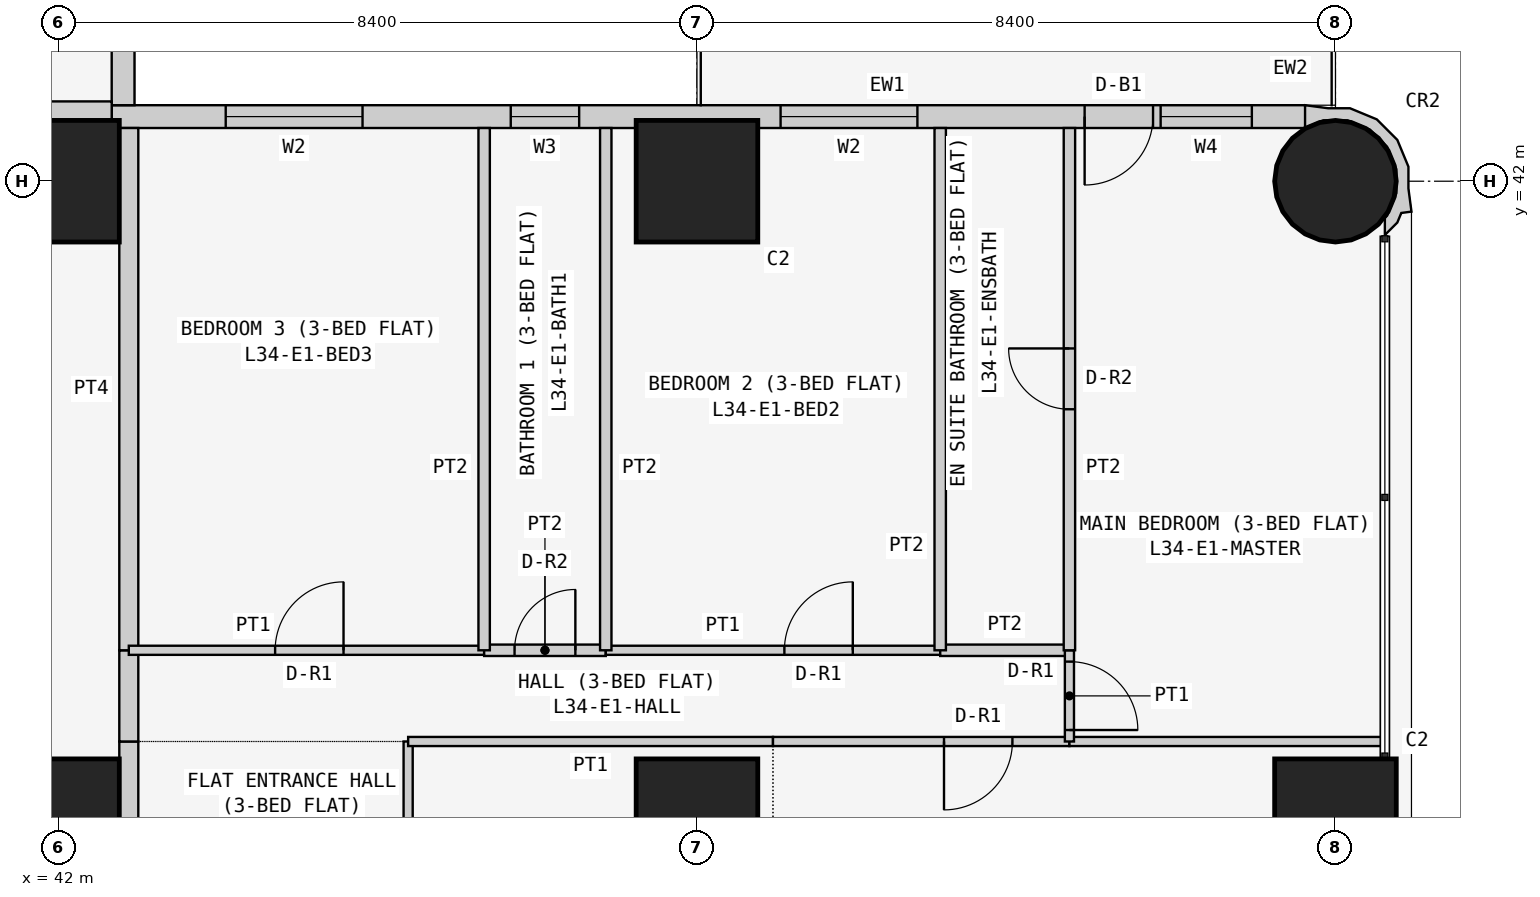
"""IFC4 building model, lengths in metres.
Left out: names, types, materials, properties, quantities, classifications, styles, units other than length and angle.
Written with IfcOpenShell. Run it as: python <this file> out.ifc"""

import sys

from ifc_helpers import new_model, si_unit, direction, frame, frame_2d, origin, origin_2d, place, context, subcontext, project, spatial, polyline, rectangle, circle, outline, extrude, element, fill, save


model = new_model("IFC4")
c1 = context("Model", 3, precision=1e-05, world=origin(), true_north=direction((0.0, 1.0)))
c2 = subcontext(c1, "Body", "Model", "MODEL_VIEW")
j1 = project(units=[si_unit("LENGTHUNIT", "METRE"), si_unit("PLANEANGLEUNIT", "RADIAN")], contexts=[c1])
p1 = place(None, origin())
s1 = spatial("IfcSite", under=j1, at=p1, CompositionType="ELEMENT")
p2 = place(p1, origin())
s2 = spatial("IfcBuilding", under=s1, at=p2, CompositionType="ELEMENT")
p3 = place(p2, frame((0.0, 0.0, 134.1)))
s3 = spatial("IfcBuildingStorey", under=s2, at=p3, CompositionType="ELEMENT", Elevation=134.1)
for number, where, z_axis, x_axis in (
    (1, (42.0, 33.6, 0.0), (0.0, 0.0, 1.0), (1.0, 0.0, 0.0)),
    (2, (42.0, 42.0, 0.0), (0.0, 0.0, 1.0), (1.0, 0.0, 0.0)),
    (3, (50.4, 33.6, 0.0), (0.0, 0.0, 1.0), (1.0, 0.0, 0.0)),
    (4, (50.4, 42.0, 0.0), (0.0, 0.0, 1.0), (1.0, 0.0, 0.0)),
    (5, (58.8, 33.6, 0.0), (0.0, 0.0, 1.0), (1.0, 0.0, 0.0)),
):
    element("IfcColumn", number, at=place(p3, frame(where, z_axis=z_axis, x_axis=x_axis)), inside=s3, PredefinedType="COLUMN", context=c2, shape_type="SweptSolid", body=[
        extrude(rectangle(XDim=1.6, YDim=1.6, at=origin_2d()), origin(), (0.0, 0.0, 1.0), 3.6),
    ])
p4 = place(p3, frame((58.8, 42.0, 0.0), z_axis=(0.0, 0.0, 1.0), x_axis=(1.0, 0.0, 0.0)))
e6 = element("IfcColumn", 6, at=p4, inside=s3, PredefinedType="COLUMN", context=c2, shape_type="SweptSolid", body=[
    extrude(circle(Radius=0.8, at=origin_2d()), origin(), (0.0, 0.0, 1.0), 3.6),
])
p5 = place(p3, frame((58.4, 42.85, 0.0), z_axis=(0.0, 0.0, 1.0), x_axis=(-1.0, 0.0, 0.0)))
e7 = element("IfcWall", 7, at=p5, inside=s3, PredefinedType="SOLIDWALL", context=c2, shape_type="SweptSolid", body=[
    extrude(rectangle(XDim=15.7, YDim=0.3, at=frame_2d((7.85, 0.0))), origin(), (0.0, 0.0, 1.0), 3.45),
])
p6 = place(p5, frame((12.4, 0.0, 0.9)))
e8 = element("IfcOpeningElement", 8, at=p6, cuts=e7, PredefinedType="OPENING", context=c2, shape_type="SweptSolid", body=[
    extrude(rectangle(XDim=1.8, YDim=1.5, at=frame_2d((0.9, 0.75))), frame((0.0, 0.16, 0.0), z_axis=(0.0, -1.0, 0.0), x_axis=(1.0, 0.0, 0.0)), (0.0, 0.0, 1.0), 0.32),
])
p7 = place(p5, frame((9.55, 0.0, 1.5)))
e9 = element("IfcOpeningElement", 9, at=p7, cuts=e7, PredefinedType="OPENING", context=c2, shape_type="SweptSolid", body=[
    extrude(rectangle(XDim=0.9, YDim=0.7, at=frame_2d((0.45, 0.35))), frame((0.0, 0.16, 0.0), z_axis=(0.0, -1.0, 0.0), x_axis=(1.0, 0.0, 0.0)), (0.0, 0.0, 1.0), 0.32),
])
p8 = place(p5, frame((5.1, 0.0, 0.9)))
e10 = element("IfcOpeningElement", 10, at=p8, cuts=e7, PredefinedType="OPENING", context=c2, shape_type="SweptSolid", body=[
    extrude(rectangle(XDim=1.8, YDim=1.5, at=frame_2d((0.9, 0.75))), frame((0.0, 0.16, 0.0), z_axis=(0.0, -1.0, 0.0), x_axis=(1.0, 0.0, 0.0)), (0.0, 0.0, 1.0), 0.32),
])
p9 = place(p5, frame((2.0, 0.0, 0.0)))
e11 = element("IfcOpeningElement", 11, at=p9, cuts=e7, PredefinedType="OPENING", context=c2, shape_type="SweptSolid", body=[
    extrude(rectangle(XDim=0.9, YDim=2.4, at=frame_2d((0.45, 1.2))), frame((0.0, 0.16, 0.0), z_axis=(0.0, -1.0, 0.0), x_axis=(1.0, 0.0, 0.0)), (0.0, 0.0, 1.0), 0.32),
])
p10 = place(p5, frame((0.7, 0.0, 0.9)))
e12 = element("IfcOpeningElement", 12, at=p10, cuts=e7, PredefinedType="OPENING", context=c2, shape_type="SweptSolid", body=[
    extrude(rectangle(XDim=1.2, YDim=1.5, at=frame_2d((0.6, 0.75))), frame((0.0, 0.16, 0.0), z_axis=(0.0, -1.0, 0.0), x_axis=(1.0, 0.0, 0.0)), (0.0, 0.0, 1.0), 0.32),
])
p11 = place(p3, frame((42.85, 43.0, 0.0), z_axis=(0.0, 0.0, 1.0), x_axis=(0.0, 1.0, 0.0)))
e13 = element("IfcWall", 13, at=p11, inside=s3, PredefinedType="SOLIDWALL", context=c2, shape_type="SweptSolid", body=[
    extrude(rectangle(XDim=7.0, YDim=0.3, at=frame_2d((3.5, 0.0))), origin(), (0.0, 0.0, 1.0), 3.45),
])
p12 = place(p11, frame((1.5, 0.0, 0.9)))
e14 = element("IfcOpeningElement", 14, at=p12, cuts=e13, PredefinedType="OPENING", context=c2, shape_type="SweptSolid", body=[
    extrude(rectangle(XDim=2.4, YDim=1.5, at=frame_2d((1.2, 0.75))), frame((0.0, 0.16, 0.0), z_axis=(0.0, -1.0, 0.0), x_axis=(1.0, 0.0, 0.0)), (0.0, 0.0, 1.0), 0.32),
])
p13 = place(p11, frame((5.05, 0.0, 0.9)))
e15 = element("IfcOpeningElement", 15, at=p13, cuts=e13, PredefinedType="OPENING", context=c2, shape_type="SweptSolid", body=[
    extrude(rectangle(XDim=1.2, YDim=1.5, at=frame_2d((0.6, 0.75))), frame((0.0, 0.16, 0.0), z_axis=(0.0, -1.0, 0.0), x_axis=(1.0, 0.0, 0.0)), (0.0, 0.0, 1.0), 0.32),
])
p14 = place(p3, frame((59.395, 41.352, 0.0), z_axis=(0.0, 0.0, 1.0), x_axis=(0.93923434088, 0.343276641956, 0.0)))
e16 = element("IfcWall", 16, at=p14, inside=s3, PredefinedType="SOLIDWALL", context=c2, shape_type="SweptSolid", body=[
    extrude(outline(polyline([(0.532, 0.393), (0.631, 0.663), (0.614, 1.044), (0.453, 1.391), (0.172, 1.649), (-0.097, 1.748), (-0.369, 1.89), (-0.509, 1.621), (-0.491, 1.615), (-0.479, 1.609), (-0.211, 1.62), (0.088, 1.511), (0.323, 1.295), (0.457, 1.006), (0.47, 0.688), (0.361, 0.389), (0.145, 0.154), (0.108, 0.136), (0.031, -0.075), (0.241, 0.023), (0.333, 0.124), (0.465, 0.094), (0.532, 0.393)])), origin(), (0.0, 0.0, 1.0), 3.45),
])
p15 = place(p3, frame((35.829, 42.925, 0.0), z_axis=(0.0, 0.0, 1.0), x_axis=(1.0, 0.0, 0.0)))
e17 = element("IfcWall", 17, at=p15, inside=s3, PredefinedType="PARTITIONING", context=c2, shape_type="SweptSolid", body=[
    extrude(rectangle(XDim=6.871, YDim=0.25, at=frame_2d((3.436, 0.0))), origin(), (0.0, 0.0, 1.0), 3.45),
])
p16 = place(p3, frame((42.925, 34.629, 0.0), z_axis=(0.0, 0.0, 1.0), x_axis=(0.0, -1.0, 0.0)))
e18 = element("IfcWall", 18, at=p16, inside=s3, PredefinedType="PARTITIONING", context=c2, shape_type="SweptSolid", body=[
    extrude(rectangle(XDim=5.229, YDim=0.25, at=frame_2d((2.615, 0.0))), origin(), (0.0, 0.0, 1.0), 3.45),
])
p17 = place(p16, frame((2.129, 0.0, 0.0)))
e19 = element("IfcOpeningElement", 19, at=p17, cuts=e18, PredefinedType="OPENING", context=c2, shape_type="SweptSolid", body=[
    extrude(rectangle(XDim=1.0, YDim=2.1, at=frame_2d((0.5, 1.05))), frame((0.0, 0.135, 0.0), z_axis=(0.0, -1.0, 0.0), x_axis=(1.0, 0.0, 0.0)), (0.0, 0.0, 1.0), 0.27),
])
p18 = place(p3, frame((42.925, 35.829, 0.0), z_axis=(0.0, 0.0, 1.0), x_axis=(0.0, -1.0, 0.0)))
e20 = element("IfcWall", 20, at=p18, inside=s3, PredefinedType="PARTITIONING", context=c2, shape_type="SweptSolid", body=[
    extrude(rectangle(XDim=1.2, YDim=0.25, at=frame_2d((0.6, 0.0))), origin(), (0.0, 0.0, 1.0), 3.45),
])
p19 = place(p3, frame((42.925, 42.7, 0.0), z_axis=(0.0, 0.0, 1.0), x_axis=(0.0, -1.0, 0.0)))
e21 = element("IfcWall", 21, at=p19, inside=s3, PredefinedType="PARTITIONING", context=c2, shape_type="SweptSolid", body=[
    extrude(rectangle(XDim=6.871, YDim=0.25, at=frame_2d((3.436, 0.0))), origin(), (0.0, 0.0, 1.0), 3.45),
])
p20 = place(p3, frame((46.6, 29.4, 0.0), z_axis=(0.0, 0.0, 1.0), x_axis=(0.0, 1.0, 0.0)))
e22 = element("IfcWall", 22, at=p20, inside=s3, PredefinedType="PARTITIONING", context=c2, shape_type="SweptSolid", body=[
    extrude(rectangle(XDim=5.229, YDim=0.12, at=frame_2d((2.615, 0.0))), origin(), (0.0, 0.0, 1.0), 3.45),
])
p21 = place(p20, frame((1.05, 0.0, 0.0)))
e23 = element("IfcOpeningElement", 23, at=p21, cuts=e22, PredefinedType="OPENING", context=c2, shape_type="SweptSolid", body=[
    extrude(rectangle(XDim=0.9, YDim=2.1, at=frame_2d((0.45, 1.05))), frame((0.0, 0.07, 0.0), z_axis=(0.0, -1.0, 0.0), x_axis=(1.0, 0.0, 0.0)), (0.0, 0.0, 1.0), 0.14),
])
p22 = place(p3, frame((51.4, 34.629, 0.0), z_axis=(0.0, 0.0, 1.0), x_axis=(-1.0, 0.0, 0.0)))
e24 = element("IfcWall", 24, at=p22, inside=s3, PredefinedType="PARTITIONING", context=c2, shape_type="SweptSolid", body=[
    extrude(rectangle(XDim=4.8, YDim=0.12, at=frame_2d((2.4, 0.0))), origin(), (0.0, 0.0, 1.0), 3.45),
])
p23 = place(p3, frame((55.3, 34.629, 0.0), z_axis=(0.0, 0.0, 1.0), x_axis=(-1.0, 0.0, 0.0)))
e25 = element("IfcWall", 25, at=p23, inside=s3, PredefinedType="PARTITIONING", context=c2, shape_type="SweptSolid", body=[
    extrude(rectangle(XDim=3.9, YDim=0.12, at=frame_2d((1.95, 0.0))), origin(), (0.0, 0.0, 1.0), 3.45),
])
p24 = place(p23, frame((0.75, 0.0, 0.0)))
e26 = element("IfcOpeningElement", 26, at=p24, cuts=e25, PredefinedType="OPENING", context=c2, shape_type="SweptSolid", body=[
    extrude(rectangle(XDim=0.9, YDim=2.1, at=frame_2d((0.45, 1.05))), frame((0.0, 0.07, 0.0), z_axis=(0.0, -1.0, 0.0), x_axis=(1.0, 0.0, 0.0)), (0.0, 0.0, 1.0), 0.14),
])
p25 = place(p3, frame((59.45, 34.629, 0.0), z_axis=(0.0, 0.0, 1.0), x_axis=(-1.0, 0.0, 0.0)))
e27 = element("IfcWall", 27, at=p25, inside=s3, PredefinedType="PARTITIONING", context=c2, shape_type="SweptSolid", body=[
    extrude(rectangle(XDim=4.15, YDim=0.12, at=frame_2d((2.075, 0.0))), origin(), (0.0, 0.0, 1.0), 3.45),
])
p26 = place(p3, frame((47.6, 35.829, 0.0), z_axis=(0.0, 0.0, 1.0), x_axis=(-1.0, 0.0, 0.0)))
e28 = element("IfcWall", 28, at=p26, inside=s3, PredefinedType="PARTITIONING", context=c2, shape_type="SweptSolid", body=[
    extrude(rectangle(XDim=4.675, YDim=0.12, at=frame_2d((2.337, 0.0))), origin(), (0.0, 0.0, 1.0), 3.45),
])
p27 = place(p26, frame((1.85, 0.0, 0.0)))
e29 = element("IfcOpeningElement", 29, at=p27, cuts=e28, PredefinedType="OPENING", context=c2, shape_type="SweptSolid", body=[
    extrude(rectangle(XDim=0.9, YDim=2.1, at=frame_2d((0.45, 1.05))), frame((0.0, 0.07, 0.0), z_axis=(0.0, -1.0, 0.0), x_axis=(1.0, 0.0, 0.0)), (0.0, 0.0, 1.0), 0.14),
])
p28 = place(p3, frame((49.2, 35.829, 0.0), z_axis=(0.0, 0.0, 1.0), x_axis=(-1.0, 0.0, 0.0)))
e30 = element("IfcWall", 30, at=p28, inside=s3, PredefinedType="PARTITIONING", context=c2, shape_type="SweptSolid", body=[
    extrude(rectangle(XDim=1.6, YDim=0.15, at=frame_2d((0.8, 0.0))), origin(), (0.0, 0.0, 1.0), 3.45),
])
p29 = place(p28, frame((0.4, 0.0, 0.0)))
e31 = element("IfcOpeningElement", 31, at=p29, cuts=e30, PredefinedType="OPENING", context=c2, shape_type="SweptSolid", body=[
    extrude(rectangle(XDim=0.8, YDim=2.1, at=frame_2d((0.4, 1.05))), frame((0.0, 0.085, 0.0), z_axis=(0.0, -1.0, 0.0), x_axis=(1.0, 0.0, 0.0)), (0.0, 0.0, 1.0), 0.17),
])
p30 = place(p3, frame((53.6, 35.829, 0.0), z_axis=(0.0, 0.0, 1.0), x_axis=(-1.0, 0.0, 0.0)))
e32 = element("IfcWall", 32, at=p30, inside=s3, PredefinedType="PARTITIONING", context=c2, shape_type="SweptSolid", body=[
    extrude(rectangle(XDim=4.4, YDim=0.12, at=frame_2d((2.2, 0.0))), origin(), (0.0, 0.0, 1.0), 3.45),
])
p31 = place(p30, frame((1.15, 0.0, 0.0)))
e33 = element("IfcOpeningElement", 33, at=p31, cuts=e32, PredefinedType="OPENING", context=c2, shape_type="SweptSolid", body=[
    extrude(rectangle(XDim=0.9, YDim=2.1, at=frame_2d((0.45, 1.05))), frame((0.0, 0.07, 0.0), z_axis=(0.0, -1.0, 0.0), x_axis=(1.0, 0.0, 0.0)), (0.0, 0.0, 1.0), 0.14),
])
p32 = place(p3, frame((55.3, 35.829, 0.0), z_axis=(0.0, 0.0, 1.0), x_axis=(-1.0, 0.0, 0.0)))
e34 = element("IfcWall", 34, at=p32, inside=s3, PredefinedType="PARTITIONING", context=c2, shape_type="SweptSolid", body=[
    extrude(rectangle(XDim=1.7, YDim=0.15, at=frame_2d((0.85, 0.0))), origin(), (0.0, 0.0, 1.0), 3.45),
])
p33 = place(p3, frame((55.3, 34.629, 0.0), z_axis=(0.0, 0.0, 1.0), x_axis=(0.0, 1.0, 0.0)))
e35 = element("IfcWall", 35, at=p33, inside=s3, PredefinedType="PARTITIONING", context=c2, shape_type="SweptSolid", body=[
    extrude(rectangle(XDim=1.2, YDim=0.12, at=frame_2d((0.6, 0.0))), origin(), (0.0, 0.0, 1.0), 3.45),
])
p34 = place(p33, frame((0.151, 0.0, 0.0)))
e36 = element("IfcOpeningElement", 36, at=p34, cuts=e35, PredefinedType="OPENING", context=c2, shape_type="SweptSolid", body=[
    extrude(rectangle(XDim=0.9, YDim=2.1, at=frame_2d((0.45, 1.05))), frame((0.0, 0.07, 0.0), z_axis=(0.0, -1.0, 0.0), x_axis=(1.0, 0.0, 0.0)), (0.0, 0.0, 1.0), 0.14),
])
for number, where, z_axis, x_axis in (
    (37, (47.6, 35.829, 0.0), (0.0, 0.0, 1.0), (0.0, 1.0, 0.0)),
    (38, (49.2, 35.829, 0.0), (0.0, 0.0, 1.0), (0.0, 1.0, 0.0)),
    (39, (53.6, 35.829, 0.0), (0.0, 0.0, 1.0), (0.0, 1.0, 0.0)),
):
    element("IfcWall", number, at=place(p3, frame(where, z_axis=z_axis, x_axis=x_axis)), inside=s3, PredefinedType="PARTITIONING", context=c2, shape_type="SweptSolid", body=[
        extrude(rectangle(XDim=6.871, YDim=0.15, at=frame_2d((3.436, 0.0))), origin(), (0.0, 0.0, 1.0), 3.45),
    ])
p35 = place(p3, frame((55.3, 35.829, 0.0), z_axis=(0.0, 0.0, 1.0), x_axis=(0.0, 1.0, 0.0)))
e40 = element("IfcWall", 40, at=p35, inside=s3, PredefinedType="PARTITIONING", context=c2, shape_type="SweptSolid", body=[
    extrude(rectangle(XDim=6.871, YDim=0.15, at=frame_2d((3.436, 0.0))), origin(), (0.0, 0.0, 1.0), 3.45),
])
p36 = place(p35, frame((3.171, 0.0, 0.0)))
e41 = element("IfcOpeningElement", 41, at=p36, cuts=e40, PredefinedType="OPENING", context=c2, shape_type="SweptSolid", body=[
    extrude(rectangle(XDim=0.8, YDim=2.1, at=frame_2d((0.4, 1.05))), frame((0.0, 0.085, 0.0), z_axis=(0.0, -1.0, 0.0), x_axis=(1.0, 0.0, 0.0)), (0.0, 0.0, 1.0), 0.17),
])
p37 = place(p6, origin())
e42 = element("IfcWindow", 42, at=p37, inside=s3, PartitioningType="SINGLE_PANEL", PredefinedType="WINDOW", context=c2, shape_type="SweptSolid", body=[
    extrude(rectangle(XDim=1.8, YDim=1.5, at=frame_2d((0.9, 0.75))), frame((0.0, 0.03, 0.0), z_axis=(0.0, -1.0, 0.0), x_axis=(1.0, 0.0, 0.0)), (0.0, 0.0, 1.0), 0.06),
])
fill(e8, e42)
p38 = place(p7, origin())
e43 = element("IfcWindow", 43, at=p38, inside=s3, PartitioningType="SINGLE_PANEL", PredefinedType="WINDOW", context=c2, shape_type="SweptSolid", body=[
    extrude(rectangle(XDim=0.9, YDim=0.7, at=frame_2d((0.45, 0.35))), frame((0.0, 0.03, 0.0), z_axis=(0.0, -1.0, 0.0), x_axis=(1.0, 0.0, 0.0)), (0.0, 0.0, 1.0), 0.06),
])
fill(e9, e43)
p39 = place(p8, origin())
e44 = element("IfcWindow", 44, at=p39, inside=s3, PartitioningType="SINGLE_PANEL", PredefinedType="WINDOW", context=c2, shape_type="SweptSolid", body=[
    extrude(rectangle(XDim=1.8, YDim=1.5, at=frame_2d((0.9, 0.75))), frame((0.0, 0.03, 0.0), z_axis=(0.0, -1.0, 0.0), x_axis=(1.0, 0.0, 0.0)), (0.0, 0.0, 1.0), 0.06),
])
fill(e10, e44)
p40 = place(p9, origin())
e45 = element("IfcDoor", 45, at=p40, inside=s3, OperationType="SINGLE_SWING_RIGHT", PredefinedType="DOOR", context=c2, shape_type="SweptSolid", body=[
    extrude(rectangle(XDim=0.9, YDim=2.4, at=frame_2d((0.45, 1.2))), frame((0.0, 0.025, 0.0), z_axis=(0.0, -1.0, 0.0), x_axis=(1.0, 0.0, 0.0)), (0.0, 0.0, 1.0), 0.05),
])
fill(e11, e45)
p41 = place(p10, origin())
e46 = element("IfcWindow", 46, at=p41, inside=s3, PartitioningType="SINGLE_PANEL", PredefinedType="WINDOW", context=c2, shape_type="SweptSolid", body=[
    extrude(rectangle(XDim=1.2, YDim=1.5, at=frame_2d((0.6, 0.75))), frame((0.0, 0.03, 0.0), z_axis=(0.0, -1.0, 0.0), x_axis=(1.0, 0.0, 0.0)), (0.0, 0.0, 1.0), 0.06),
])
fill(e12, e46)
p42 = place(p24, origin())
e47 = element("IfcDoor", 47, at=p42, inside=s3, OperationType="SINGLE_SWING_RIGHT", PredefinedType="DOOR", context=c2, shape_type="SweptSolid", body=[
    extrude(rectangle(XDim=0.9, YDim=2.1, at=frame_2d((0.45, 1.05))), frame((0.0, 0.025, 0.0), z_axis=(0.0, -1.0, 0.0), x_axis=(1.0, 0.0, 0.0)), (0.0, 0.0, 1.0), 0.05),
])
fill(e26, e47)
p43 = place(p27, frame((0.9, 0.0, 0.0), z_axis=(0.0, 0.0, 1.0), x_axis=(-1.0, 0.0, 0.0)))
e48 = element("IfcDoor", 48, at=p43, inside=s3, OperationType="SINGLE_SWING_RIGHT", PredefinedType="DOOR", context=c2, shape_type="SweptSolid", body=[
    extrude(rectangle(XDim=0.9, YDim=2.1, at=frame_2d((0.45, 1.05))), frame((0.0, 0.025, 0.0), z_axis=(0.0, -1.0, 0.0), x_axis=(1.0, 0.0, 0.0)), (0.0, 0.0, 1.0), 0.05),
])
fill(e29, e48)
p44 = place(p29, frame((0.8, 0.0, 0.0), z_axis=(0.0, 0.0, 1.0), x_axis=(-1.0, 0.0, 0.0)))
e49 = element("IfcDoor", 49, at=p44, inside=s3, OperationType="SINGLE_SWING_RIGHT", PredefinedType="DOOR", context=c2, shape_type="SweptSolid", body=[
    extrude(rectangle(XDim=0.8, YDim=2.1, at=frame_2d((0.4, 1.05))), frame((0.0, 0.025, 0.0), z_axis=(0.0, -1.0, 0.0), x_axis=(1.0, 0.0, 0.0)), (0.0, 0.0, 1.0), 0.05),
])
fill(e31, e49)
p45 = place(p31, frame((0.9, 0.0, 0.0), z_axis=(0.0, 0.0, 1.0), x_axis=(-1.0, 0.0, 0.0)))
e50 = element("IfcDoor", 50, at=p45, inside=s3, OperationType="SINGLE_SWING_RIGHT", PredefinedType="DOOR", context=c2, shape_type="SweptSolid", body=[
    extrude(rectangle(XDim=0.9, YDim=2.1, at=frame_2d((0.45, 1.05))), frame((0.0, 0.025, 0.0), z_axis=(0.0, -1.0, 0.0), x_axis=(1.0, 0.0, 0.0)), (0.0, 0.0, 1.0), 0.05),
])
fill(e33, e50)
p46 = place(p34, frame((0.9, 0.0, 0.0), z_axis=(0.0, 0.0, 1.0), x_axis=(-1.0, 0.0, 0.0)))
e51 = element("IfcDoor", 51, at=p46, inside=s3, OperationType="SINGLE_SWING_RIGHT", PredefinedType="DOOR", context=c2, shape_type="SweptSolid", body=[
    extrude(rectangle(XDim=0.9, YDim=2.1, at=frame_2d((0.45, 1.05))), frame((0.0, 0.025, 0.0), z_axis=(0.0, -1.0, 0.0), x_axis=(1.0, 0.0, 0.0)), (0.0, 0.0, 1.0), 0.05),
])
fill(e36, e51)
p47 = place(p36, origin())
e52 = element("IfcDoor", 52, at=p47, inside=s3, OperationType="SINGLE_SWING_RIGHT", PredefinedType="DOOR", context=c2, shape_type="SweptSolid", body=[
    extrude(rectangle(XDim=0.8, YDim=2.1, at=frame_2d((0.4, 1.05))), frame((0.0, 0.025, 0.0), z_axis=(0.0, -1.0, 0.0), x_axis=(1.0, 0.0, 0.0)), (0.0, 0.0, 1.0), 0.05),
])
fill(e41, e52)
save(model, sys.argv[1])
